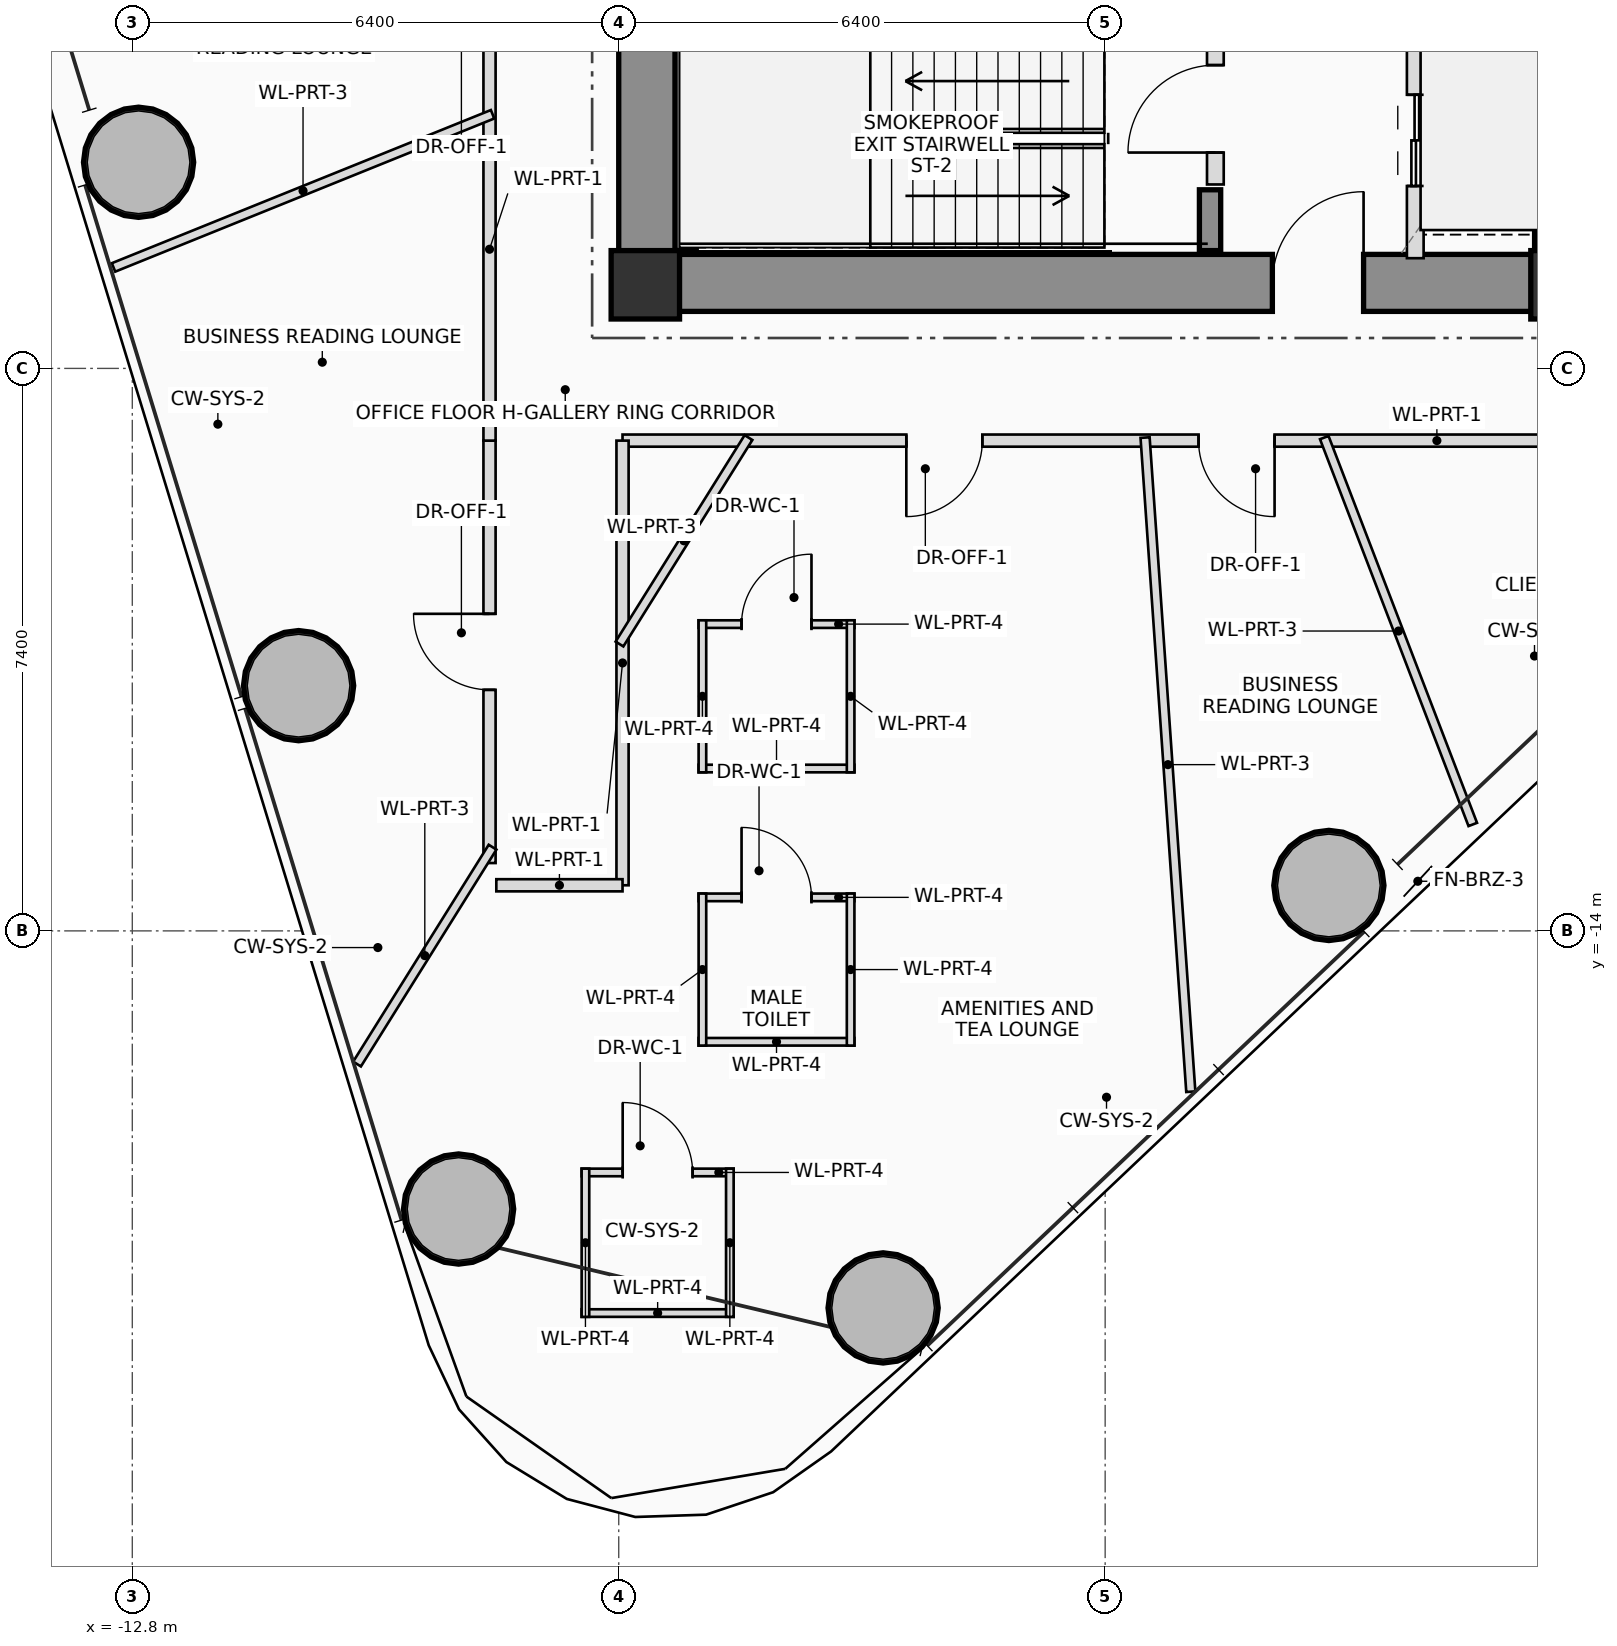
"""IFC4 building model, lengths in metres.
Left out: names, types, materials, properties, quantities, classifications, styles, units other than length and angle.
Written with IfcOpenShell. Run it as: python <this file> out.ifc"""

import sys

from ifc_helpers import new_model, si_unit, direction, frame, frame_2d, origin, origin_2d, place, context, subcontext, project, spatial, rectangle, hollow_circle, extrude, source, transform, mapped, element, fill, save


model = new_model("IFC4")
c1 = context("Model", 3, precision=1e-05, world=origin(), true_north=direction((0.0, 1.0)))
c2 = subcontext(c1, "Body", "Model", "MODEL_VIEW")
j1 = project(units=[si_unit("LENGTHUNIT", "METRE"), si_unit("PLANEANGLEUNIT", "RADIAN")], contexts=[c1])
p1 = place(None, origin())
s1 = spatial("IfcSite", under=j1, at=p1, CompositionType="ELEMENT")
p2 = place(p1, origin())
s2 = spatial("IfcBuilding", under=s1, at=p2, CompositionType="ELEMENT")
p3 = place(p2, frame((0.0, 0.0, 104.9)))
s3 = spatial("IfcBuildingStorey", under=s2, at=p3, CompositionType="ELEMENT", Elevation=104.9)
m1 = source(origin(), c2, "Body", "SweptSolid", [
    extrude(rectangle(XDim=0.9, YDim=0.9, at=origin_2d()), origin(), (0.0, 0.0, 1.0), 3.75),
])
for number, where, z_axis, x_axis in (
    (1, (-6.05, -5.5, 0.0), (0.0, 0.0, 1.0), (1.0, 0.0, 0.0)),
    (2, (6.05, -5.5, 0.0), (0.0, 0.0, 1.0), (1.0, 0.0, 0.0)),
):
    element("IfcColumn", number, at=place(p3, frame(where, z_axis=z_axis, x_axis=x_axis)), inside=s3, PredefinedType="COLUMN", context=c2, shape_type="MappedRepresentation", body=[
        mapped(m1, transform((0.0, 0.0, 0.0), scale=1.0)),
    ])
p4 = place(p3, frame((-6.4, -5.475, 0.0), z_axis=(0.0, 0.0, 1.0), x_axis=(1.0, 0.0, 0.0)))
e3 = element("IfcWall", 3, at=p4, inside=s3, PredefinedType="SHEAR", context=c2, shape_type="SweptSolid", body=[
    extrude(rectangle(XDim=12.8, YDim=0.75, at=frame_2d((6.4, 0.0))), origin(), (0.0, 0.0, 1.0), 3.75),
])
p5 = place(p4, frame((8.6, 0.0, 0.0)))
e4 = element("IfcOpeningElement", 4, at=p5, cuts=e3, PredefinedType="OPENING", context=c2, shape_type="SweptSolid", body=[
    extrude(rectangle(XDim=1.2, YDim=2.2, at=frame_2d((0.6, 1.1))), frame((0.0, 0.385, 0.0), z_axis=(0.0, -1.0, 0.0), x_axis=(1.0, 0.0, 0.0)), (0.0, 0.0, 1.0), 0.77),
])
p6 = place(p3, frame((6.025, -5.1, 0.0), z_axis=(0.0, 0.0, 1.0), x_axis=(0.0, 1.0, 0.0)))
e5 = element("IfcWall", 5, at=p6, inside=s3, PredefinedType="SHEAR", context=c2, shape_type="SweptSolid", body=[
    extrude(rectangle(XDim=10.2, YDim=0.75, at=frame_2d((5.1, 0.0))), origin(), (0.0, 0.0, 1.0), 3.75),
])
p7 = place(p3, frame((-6.025, -5.1, 0.0), z_axis=(0.0, 0.0, 1.0), x_axis=(0.0, 1.0, 0.0)))
e6 = element("IfcWall", 6, at=p7, inside=s3, PredefinedType="SHEAR", context=c2, shape_type="SweptSolid", body=[
    extrude(rectangle(XDim=3.35, YDim=0.75, at=frame_2d((1.675, 0.0))), origin(), (0.0, 0.0, 1.0), 3.75),
])
p8 = place(p3, frame((-5.52, -5.05, 0.0), z_axis=(0.0, 0.0, 1.0), x_axis=(0.0, 1.0, 0.0)))
e7 = element("IfcWall", 7, at=p8, inside=s3, PredefinedType="SHEAR", context=c2, shape_type="SweptSolid", body=[
    extrude(rectangle(XDim=2.75, YDim=0.28, at=frame_2d((1.375, 0.0))), origin(), (0.0, 0.0, 1.0), 3.75),
])
p9 = place(p3, frame((1.38, -5.05, 0.0), z_axis=(0.0, 0.0, 1.0), x_axis=(0.0, 1.0, 0.0)))
e8 = element("IfcWall", 8, at=p9, inside=s3, PredefinedType="SHEAR", context=c2, shape_type="SweptSolid", body=[
    extrude(rectangle(XDim=0.8, YDim=0.28, at=frame_2d((0.4, 0.0))), origin(), (0.0, 0.0, 1.0), 3.75),
])
m2 = source(origin(), c2, "Body", "SweptSolid", [
    extrude(hollow_circle(Radius=0.725, WallThickness=0.05, at=origin_2d()), origin(), (0.0, 0.0, 1.0), 3.75),
])
for number, where, z_axis, x_axis in (
    (9, (-2.921, -18.96, 0.0), (0.0, 0.0, 1.0), (1.0, 0.0, 0.0)),
    (10, (2.943, -13.402, 0.0), (0.0, 0.0, 1.0), (1.0, 0.0, 0.0)),
    (11, (-12.717, -3.888, 0.0), (0.0, 0.0, 1.0), (1.0, 0.0, 0.0)),
    (12, (-10.612, -10.774, 0.0), (0.0, 0.0, 1.0), (1.0, 0.0, 0.0)),
    (13, (-8.507, -17.659, 0.0), (0.0, 0.0, 1.0), (1.0, 0.0, 0.0)),
):
    element("IfcColumn", number, at=place(p3, frame(where, z_axis=z_axis, x_axis=x_axis)), inside=s3, PredefinedType="COLUMN", context=c2, shape_type="MappedRepresentation", body=[
        mapped(m2, transform((0.0, 0.0, 0.0), scale=1.0)),
    ])
p10 = place(p3, frame((1.45, -4.18, 0.0), z_axis=(0.0, 0.0, 1.0), x_axis=(0.0, 1.0, 0.0)))
e14 = element("IfcWall", 14, at=p10, inside=s3, PredefinedType="PLUMBINGWALL", context=c2, shape_type="SweptSolid", body=[
    extrude(rectangle(XDim=1.98, YDim=0.22, at=frame_2d((0.99, 0.0))), origin(), (0.0, 0.0, 1.0), 3.545),
])
p11 = place(p10, frame((0.42, 0.0, 0.0)))
e15 = element("IfcOpeningElement", 15, at=p11, cuts=e14, PredefinedType="OPENING", context=c2, shape_type="SweptSolid", body=[
    extrude(rectangle(XDim=1.15, YDim=2.15, at=frame_2d((0.575, 1.075))), frame((0.0, 0.12, 0.0), z_axis=(0.0, -1.0, 0.0), x_axis=(1.0, 0.0, 0.0)), (0.0, 0.0, 1.0), 0.24),
])
p12 = place(p3, frame((4.08, -5.15, 0.0), z_axis=(0.0, 0.0, 1.0), x_axis=(0.0, 1.0, 0.0)))
e16 = element("IfcWall", 16, at=p12, inside=s3, PredefinedType="PLUMBINGWALL", context=c2, shape_type="SweptSolid", body=[
    extrude(rectangle(XDim=2.95, YDim=0.22, at=frame_2d((1.475, 0.0))), origin(), (0.0, 0.0, 1.0), 3.545),
])
p13 = place(p12, frame((0.95, 0.0, 0.0)))
e17 = element("IfcOpeningElement", 17, at=p13, cuts=e16, PredefinedType="OPENING", context=c2, shape_type="SweptSolid", body=[
    extrude(rectangle(XDim=1.2, YDim=2.25, at=frame_2d((0.6, 1.125))), frame((0.0, 0.12, 0.0), z_axis=(0.0, -1.0, 0.0), x_axis=(1.0, 0.0, 0.0)), (0.0, 0.0, 1.0), 0.24),
])
p14 = place(p3, frame((-5.349, -13.559, 0.0), z_axis=(0.0, 0.0, 1.0), x_axis=(1.0, 0.0, 0.0)))
e18 = element("IfcWall", 18, at=p14, inside=s3, PredefinedType="PARTITIONING", context=c2, shape_type="SweptSolid", body=[
    extrude(rectangle(XDim=2.05, YDim=0.1, at=frame_2d((1.025, 0.0))), origin(), (0.0, 0.0, 1.0), 2.85),
])
p15 = place(p14, frame((0.565, 0.0, 0.0)))
e19 = element("IfcOpeningElement", 19, at=p15, cuts=e18, PredefinedType="OPENING", context=c2, shape_type="SweptSolid", body=[
    extrude(rectangle(XDim=0.92, YDim=2.1, at=frame_2d((0.46, 1.05))), frame((0.0, 0.06, 0.0), z_axis=(0.0, -1.0, 0.0), x_axis=(1.0, 0.0, 0.0)), (0.0, 0.0, 1.0), 0.12),
])
p16 = place(p3, frame((-3.299, -15.459, 0.0), z_axis=(0.0, 0.0, 1.0), x_axis=(-1.0, 0.0, 0.0)))
e20 = element("IfcWall", 20, at=p16, inside=s3, PredefinedType="PARTITIONING", context=c2, shape_type="SweptSolid", body=[
    extrude(rectangle(XDim=2.05, YDim=0.1, at=frame_2d((1.025, 0.0))), origin(), (0.0, 0.0, 1.0), 2.85),
])
for number, where, z_axis, x_axis in (
    (21, (-3.349, -13.509, 0.0), (0.0, 0.0, 1.0), (0.0, -1.0, 0.0)),
    (22, (-5.299, -15.509, 0.0), (0.0, 0.0, 1.0), (0.0, 1.0, 0.0)),
):
    element("IfcWall", number, at=place(p3, frame(where, z_axis=z_axis, x_axis=x_axis)), inside=s3, PredefinedType="PARTITIONING", context=c2, shape_type="SweptSolid", body=[
        extrude(rectangle(XDim=2.0, YDim=0.1, at=frame_2d((1.0, 0.0))), origin(), (0.0, 0.0, 1.0), 3.2),
    ])
p17 = place(p3, frame((-5.349, -9.964, 0.0), z_axis=(0.0, 0.0, 1.0), x_axis=(1.0, 0.0, 0.0)))
e23 = element("IfcWall", 23, at=p17, inside=s3, PredefinedType="PARTITIONING", context=c2, shape_type="SweptSolid", body=[
    extrude(rectangle(XDim=2.05, YDim=0.1, at=frame_2d((1.025, 0.0))), origin(), (0.0, 0.0, 1.0), 2.85),
])
p18 = place(p17, frame((0.565, 0.0, 0.0)))
e24 = element("IfcOpeningElement", 24, at=p18, cuts=e23, PredefinedType="OPENING", context=c2, shape_type="SweptSolid", body=[
    extrude(rectangle(XDim=0.92, YDim=2.1, at=frame_2d((0.46, 1.05))), frame((0.0, 0.06, 0.0), z_axis=(0.0, -1.0, 0.0), x_axis=(1.0, 0.0, 0.0)), (0.0, 0.0, 1.0), 0.12),
])
p19 = place(p3, frame((-3.299, -11.864, 0.0), z_axis=(0.0, 0.0, 1.0), x_axis=(-1.0, 0.0, 0.0)))
e25 = element("IfcWall", 25, at=p19, inside=s3, PredefinedType="PARTITIONING", context=c2, shape_type="SweptSolid", body=[
    extrude(rectangle(XDim=2.05, YDim=0.1, at=frame_2d((1.025, 0.0))), origin(), (0.0, 0.0, 1.0), 2.85),
])
for number, where, z_axis, x_axis in (
    (26, (-3.349, -9.914, 0.0), (0.0, 0.0, 1.0), (0.0, -1.0, 0.0)),
    (27, (-5.299, -11.914, 0.0), (0.0, 0.0, 1.0), (0.0, 1.0, 0.0)),
):
    element("IfcWall", number, at=place(p3, frame(where, z_axis=z_axis, x_axis=x_axis)), inside=s3, PredefinedType="PARTITIONING", context=c2, shape_type="SweptSolid", body=[
        extrude(rectangle(XDim=2.0, YDim=0.1, at=frame_2d((1.0, 0.0))), origin(), (0.0, 0.0, 1.0), 3.2),
    ])
p20 = place(p3, frame((-6.888, -17.178, 0.0), z_axis=(0.0, 0.0, 1.0), x_axis=(1.0, 0.0, 0.0)))
e28 = element("IfcWall", 28, at=p20, inside=s3, PredefinedType="PARTITIONING", context=c2, shape_type="SweptSolid", body=[
    extrude(rectangle(XDim=2.0, YDim=0.1, at=frame_2d((1.0, 0.0))), origin(), (0.0, 0.0, 1.0), 3.545),
])
p21 = place(p20, frame((0.54, 0.0, 0.0)))
e29 = element("IfcOpeningElement", 29, at=p21, cuts=e28, PredefinedType="OPENING", context=c2, shape_type="SweptSolid", body=[
    extrude(rectangle(XDim=0.92, YDim=2.1, at=frame_2d((0.46, 1.05))), frame((0.0, 0.06, 0.0), z_axis=(0.0, -1.0, 0.0), x_axis=(1.0, 0.0, 0.0)), (0.0, 0.0, 1.0), 0.12),
])
p22 = place(p3, frame((-4.888, -19.028, 0.0), z_axis=(0.0, 0.0, 1.0), x_axis=(-1.0, 0.0, 0.0)))
e30 = element("IfcWall", 30, at=p22, inside=s3, PredefinedType="PARTITIONING", context=c2, shape_type="SweptSolid", body=[
    extrude(rectangle(XDim=2.0, YDim=0.1, at=frame_2d((1.0, 0.0))), origin(), (0.0, 0.0, 1.0), 3.545),
])
for number, where, z_axis, x_axis in (
    (31, (-4.938, -17.128, 0.0), (0.0, 0.0, 1.0), (0.0, -1.0, 0.0)),
    (32, (-6.838, -19.078, 0.0), (0.0, 0.0, 1.0), (0.0, 1.0, 0.0)),
):
    element("IfcWall", number, at=place(p3, frame(where, z_axis=z_axis, x_axis=x_axis)), inside=s3, PredefinedType="PARTITIONING", context=c2, shape_type="SweptSolid", body=[
        extrude(rectangle(XDim=1.95, YDim=0.1, at=frame_2d((0.975, 0.0))), origin(), (0.0, 0.0, 1.0), 3.01),
    ])
p23 = place(p3, frame((-8.1, -13.107, 0.0), z_axis=(0.0, 0.0, 1.0), x_axis=(0.0, 1.0, 0.0)))
e33 = element("IfcWall", 33, at=p23, inside=s3, PredefinedType="PARTITIONING", context=c2, shape_type="SweptSolid", body=[
    extrude(rectangle(XDim=5.557, YDim=0.16, at=frame_2d((2.779, 0.0))), origin(), (0.0, 0.0, 1.0), 2.85),
])
p24 = place(p23, frame((2.279, 0.0, 0.0)))
e34 = element("IfcOpeningElement", 34, at=p24, cuts=e33, PredefinedType="OPENING", context=c2, shape_type="SweptSolid", body=[
    extrude(rectangle(XDim=1.0, YDim=2.25, at=frame_2d((0.5, 1.125))), frame((0.0, 0.09, 0.0), z_axis=(0.0, -1.0, 0.0), x_axis=(1.0, 0.0, 0.0)), (0.0, 0.0, 1.0), 0.18),
])
p25 = place(p3, frame((-8.1, -7.55, 0.0), z_axis=(0.0, 0.0, 1.0), x_axis=(0.0, 1.0, 0.0)))
e35 = element("IfcWall", 35, at=p25, inside=s3, PredefinedType="PARTITIONING", context=c2, shape_type="SweptSolid", body=[
    extrude(rectangle(XDim=15.1, YDim=0.16, at=frame_2d((7.55, 0.0))), origin(), (0.0, 0.0, 1.0), 2.85),
])
p26 = place(p25, frame((5.185, 0.0, 0.0)))
e36 = element("IfcOpeningElement", 36, at=p26, cuts=e35, PredefinedType="OPENING", context=c2, shape_type="SweptSolid", body=[
    extrude(rectangle(XDim=1.0, YDim=2.25, at=frame_2d((0.5, 1.125))), frame((0.0, 0.09, 0.0), z_axis=(0.0, -1.0, 0.0), x_axis=(1.0, 0.0, 0.0)), (0.0, 0.0, 1.0), 0.18),
])
p27 = place(p25, frame((9.39, 0.0, 0.0)))
e37 = element("IfcOpeningElement", 37, at=p27, cuts=e35, PredefinedType="OPENING", context=c2, shape_type="SweptSolid", body=[
    extrude(rectangle(XDim=1.0, YDim=2.25, at=frame_2d((0.5, 1.125))), frame((0.0, 0.09, 0.0), z_axis=(0.0, -1.0, 0.0), x_axis=(1.0, 0.0, 0.0)), (0.0, 0.0, 1.0), 0.18),
])
p28 = place(p25, frame((13.607, 0.0, 0.0)))
e38 = element("IfcOpeningElement", 38, at=p28, cuts=e35, PredefinedType="OPENING", context=c2, shape_type="SweptSolid", body=[
    extrude(rectangle(XDim=1.0, YDim=2.25, at=frame_2d((0.5, 1.125))), frame((0.0, 0.09, 0.0), z_axis=(0.0, -1.0, 0.0), x_axis=(1.0, 0.0, 0.0)), (0.0, 0.0, 1.0), 0.18),
])
p29 = place(p3, frame((6.35, -7.55, 0.0), z_axis=(0.0, 0.0, 1.0), x_axis=(-1.0, 0.0, 0.0)))
e39 = element("IfcWall", 39, at=p29, inside=s3, PredefinedType="PARTITIONING", context=c2, shape_type="SweptSolid", body=[
    extrude(rectangle(XDim=12.7, YDim=0.16, at=frame_2d((6.35, 0.0))), origin(), (0.0, 0.0, 1.0), 2.85),
])
p30 = place(p29, frame((4.121, 0.0, 0.0)))
e40 = element("IfcOpeningElement", 40, at=p30, cuts=e39, PredefinedType="OPENING", context=c2, shape_type="SweptSolid", body=[
    extrude(rectangle(XDim=1.0, YDim=2.25, at=frame_2d((0.5, 1.125))), frame((0.0, 0.09, 0.0), z_axis=(0.0, -1.0, 0.0), x_axis=(1.0, 0.0, 0.0)), (0.0, 0.0, 1.0), 0.18),
])
p31 = place(p29, frame((7.966, 0.0, 0.0)))
e41 = element("IfcOpeningElement", 41, at=p31, cuts=e39, PredefinedType="OPENING", context=c2, shape_type="SweptSolid", body=[
    extrude(rectangle(XDim=1.0, YDim=2.25, at=frame_2d((0.5, 1.125))), frame((0.0, 0.09, 0.0), z_axis=(0.0, -1.0, 0.0), x_axis=(1.0, 0.0, 0.0)), (0.0, 0.0, 1.0), 0.18),
])
p32 = place(p3, frame((-6.35, -7.55, 0.0), z_axis=(0.0, 0.0, 1.0), x_axis=(0.0, -1.0, 0.0)))
e42 = element("IfcWall", 42, at=p32, inside=s3, PredefinedType="PARTITIONING", context=c2, shape_type="SweptSolid", body=[
    extrude(rectangle(XDim=5.85, YDim=0.16, at=frame_2d((2.925, 0.0))), origin(), (0.0, 0.0, 1.0), 2.85),
])
p33 = place(p3, frame((-6.35, -13.4, 0.0), z_axis=(0.0, 0.0, 1.0), x_axis=(-1.0, 0.0, 0.0)))
e43 = element("IfcWall", 43, at=p33, inside=s3, PredefinedType="PARTITIONING", context=c2, shape_type="SweptSolid", body=[
    extrude(rectangle(XDim=1.66, YDim=0.16, at=frame_2d((0.83, 0.0))), origin(), (0.0, 0.0, 1.0), 2.85),
])
p34 = place(p3, frame((-8.06, -3.257, 0.0), z_axis=(0.0, 0.0, 1.0), x_axis=(-0.927184543748, -0.374604887627, 0.0)))
e44 = element("IfcWall", 44, at=p34, inside=s3, PredefinedType="PARTITIONING", context=c2, shape_type="SweptSolid", body=[
    extrude(rectangle(XDim=5.379, YDim=0.12, at=frame_2d((2.689, 0.0))), origin(), (0.0, 0.0, 1.0), 2.85),
])
p35 = place(p3, frame((-4.693, -7.51, 0.0), z_axis=(0.0, 0.0, 1.0), x_axis=(-0.529882447014, -0.848071100997, 0.0)))
e45 = element("IfcWall", 45, at=p35, inside=s3, PredefinedType="PARTITIONING", context=c2, shape_type="SweptSolid", body=[
    extrude(rectangle(XDim=3.203, YDim=0.12, at=frame_2d((1.601, 0.0))), origin(), (0.0, 0.0, 1.0), 2.85),
])
p36 = place(p3, frame((-8.06, -12.899, 0.0), z_axis=(0.0, 0.0, 1.0), x_axis=(-0.529927190475, -0.84804314324, 0.0)))
e46 = element("IfcWall", 46, at=p36, inside=s3, PredefinedType="PARTITIONING", context=c2, shape_type="SweptSolid", body=[
    extrude(rectangle(XDim=3.365, YDim=0.12, at=frame_2d((1.682, 0.0))), origin(), (0.0, 0.0, 1.0), 3.01),
])
p37 = place(p3, frame((0.525, -7.51, 0.0), z_axis=(0.0, 0.0, 1.0), x_axis=(0.069760692691, -0.997563755233, 0.0)))
e47 = element("IfcWall", 47, at=p37, inside=s3, PredefinedType="PARTITIONING", context=c2, shape_type="SweptSolid", body=[
    extrude(rectangle(XDim=8.627, YDim=0.12, at=frame_2d((4.313, 0.0))), origin(), (0.0, 0.0, 1.0), 3.01),
])
p38 = place(p3, frame((2.883, -7.51, 0.0), z_axis=(0.0, 0.0, 1.0), x_axis=(0.35836087515, -0.933583142072, 0.0)))
e48 = element("IfcWall", 48, at=p38, inside=s3, PredefinedType="PARTITIONING", context=c2, shape_type="SweptSolid", body=[
    extrude(rectangle(XDim=5.452, YDim=0.12, at=frame_2d((2.726, 0.0))), origin(), (0.0, 0.0, 1.0), 2.85),
])
p39 = place(p5, origin())
e49 = element("IfcDoor", 49, at=p39, inside=s3, OperationType="SINGLE_SWING_RIGHT", PredefinedType="DOOR", context=c2, shape_type="SweptSolid", body=[
    extrude(rectangle(XDim=1.2, YDim=2.2, at=frame_2d((0.6, 1.1))), frame((0.0, 0.025, 0.0), z_axis=(0.0, -1.0, 0.0), x_axis=(1.0, 0.0, 0.0)), (0.0, 0.0, 1.0), 0.05),
])
fill(e4, e49)
p40 = place(p11, origin())
e50 = element("IfcDoor", 50, at=p40, inside=s3, OperationType="SINGLE_SWING_LEFT", PredefinedType="DOOR", context=c2, shape_type="SweptSolid", body=[
    extrude(rectangle(XDim=1.15, YDim=2.15, at=frame_2d((0.575, 1.075))), frame((0.0, 0.025, 0.0), z_axis=(0.0, -1.0, 0.0), x_axis=(1.0, 0.0, 0.0)), (0.0, 0.0, 1.0), 0.05),
])
fill(e15, e50)
p41 = place(p13, origin())
e51 = element("IfcDoor", 51, at=p41, inside=s3, OperationType="DOUBLE_DOOR_SLIDING", PredefinedType="DOOR", context=c2, shape_type="SweptSolid", body=[
    extrude(rectangle(XDim=1.2, YDim=2.25, at=frame_2d((0.6, 1.125))), frame((0.0, 0.025, 0.0), z_axis=(0.0, -1.0, 0.0), x_axis=(1.0, 0.0, 0.0)), (0.0, 0.0, 1.0), 0.05),
])
fill(e17, e51)
p42 = place(p15, origin())
e52 = element("IfcDoor", 52, at=p42, inside=s3, OperationType="SINGLE_SWING_LEFT", PredefinedType="DOOR", context=c2, shape_type="SweptSolid", body=[
    extrude(rectangle(XDim=0.92, YDim=2.1, at=frame_2d((0.46, 1.05))), frame((0.0, 0.025, 0.0), z_axis=(0.0, -1.0, 0.0), x_axis=(1.0, 0.0, 0.0)), (0.0, 0.0, 1.0), 0.05),
])
fill(e19, e52)
p43 = place(p18, origin())
e53 = element("IfcDoor", 53, at=p43, inside=s3, OperationType="SINGLE_SWING_RIGHT", PredefinedType="DOOR", context=c2, shape_type="SweptSolid", body=[
    extrude(rectangle(XDim=0.92, YDim=2.1, at=frame_2d((0.46, 1.05))), frame((0.0, 0.025, 0.0), z_axis=(0.0, -1.0, 0.0), x_axis=(1.0, 0.0, 0.0)), (0.0, 0.0, 1.0), 0.05),
])
fill(e24, e53)
p44 = place(p21, origin())
e54 = element("IfcDoor", 54, at=p44, inside=s3, OperationType="SINGLE_SWING_LEFT", PredefinedType="DOOR", context=c2, shape_type="SweptSolid", body=[
    extrude(rectangle(XDim=0.92, YDim=2.1, at=frame_2d((0.46, 1.05))), frame((0.0, 0.025, 0.0), z_axis=(0.0, -1.0, 0.0), x_axis=(1.0, 0.0, 0.0)), (0.0, 0.0, 1.0), 0.05),
])
fill(e29, e54)
p45 = place(p24, origin())
e55 = element("IfcDoor", 55, at=p45, inside=s3, OperationType="SINGLE_SWING_RIGHT", PredefinedType="DOOR", context=c2, shape_type="SweptSolid", body=[
    extrude(rectangle(XDim=1.0, YDim=2.25, at=frame_2d((0.5, 1.125))), frame((0.0, 0.025, 0.0), z_axis=(0.0, -1.0, 0.0), x_axis=(1.0, 0.0, 0.0)), (0.0, 0.0, 1.0), 0.05),
])
fill(e34, e55)
p46 = place(p30, origin())
e56 = element("IfcDoor", 56, at=p46, inside=s3, OperationType="SINGLE_SWING_LEFT", PredefinedType="DOOR", context=c2, shape_type="SweptSolid", body=[
    extrude(rectangle(XDim=1.0, YDim=2.25, at=frame_2d((0.5, 1.125))), frame((0.0, 0.025, 0.0), z_axis=(0.0, -1.0, 0.0), x_axis=(1.0, 0.0, 0.0)), (0.0, 0.0, 1.0), 0.05),
])
fill(e40, e56)
p47 = place(p31, origin())
e57 = element("IfcDoor", 57, at=p47, inside=s3, OperationType="SINGLE_SWING_RIGHT", PredefinedType="DOOR", context=c2, shape_type="SweptSolid", body=[
    extrude(rectangle(XDim=1.0, YDim=2.25, at=frame_2d((0.5, 1.125))), frame((0.0, 0.025, 0.0), z_axis=(0.0, -1.0, 0.0), x_axis=(1.0, 0.0, 0.0)), (0.0, 0.0, 1.0), 0.05),
])
fill(e41, e57)
save(model, sys.argv[1])
